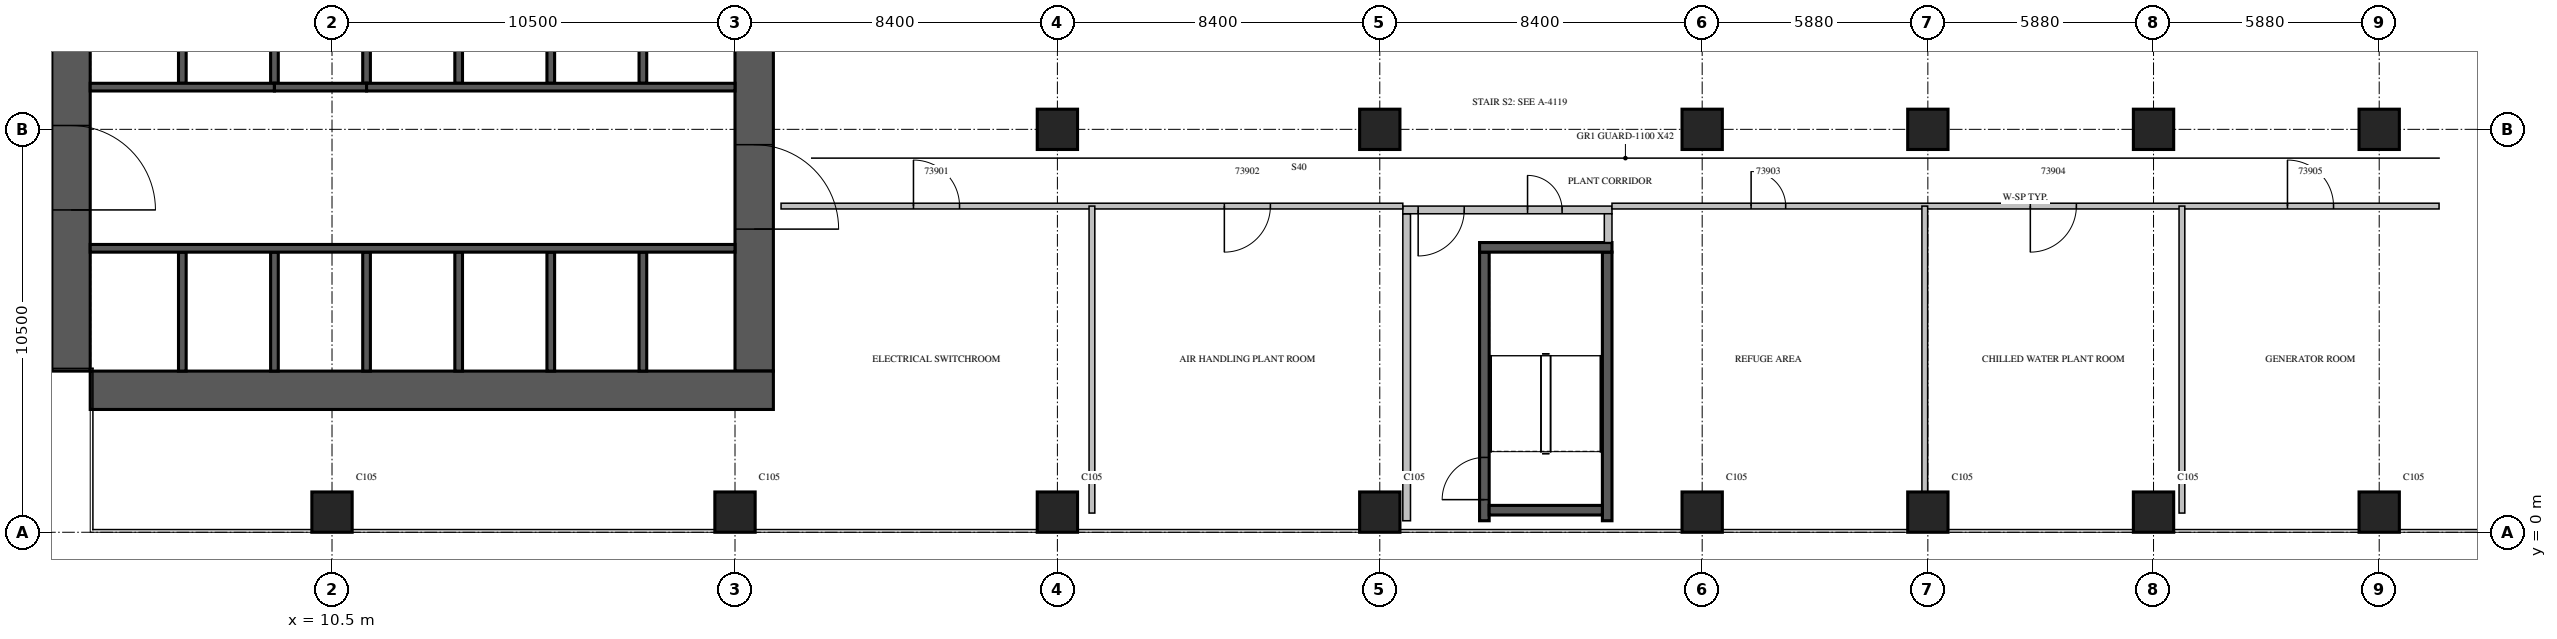
"""IFC4 building model, lengths in metres.
Left out: names, types, materials, properties, quantities, classifications, styles, units other than length and angle.
Written with IfcOpenShell. Run it as: python <this file> out.ifc"""

import sys

from ifc_helpers import new_model, si_unit, direction, frame, frame_2d, origin, origin_2d, place, context, subcontext, project, spatial, rectangle, extrude, source, transform, mapped, element, fill, save


model = new_model("IFC4")
c1 = context("Model", 3, precision=1e-05, world=origin(), true_north=direction((0.0, 1.0)))
c2 = subcontext(c1, "Body", "Model", "MODEL_VIEW")
j1 = project(units=[si_unit("LENGTHUNIT", "METRE"), si_unit("PLANEANGLEUNIT", "RADIAN")], contexts=[c1])
p1 = place(None, origin())
s1 = spatial("IfcSite", under=j1, at=p1, CompositionType="ELEMENT")
p2 = place(p1, origin())
s2 = spatial("IfcBuilding", under=s1, at=p2, CompositionType="ELEMENT")
p3 = place(p2, frame((0.0, 0.0, 162.3)))
s3 = spatial("IfcBuildingStorey", under=s2, at=p3, CompositionType="ELEMENT", Elevation=162.3)
p4 = place(p3, frame((10.5, 0.525, 0.0), z_axis=(0.0, 0.0, 1.0), x_axis=(1.0, 0.0, 0.0)))
e1 = element("IfcColumn", 1, at=p4, inside=s3, PredefinedType="COLUMN", context=c2, shape_type="SweptSolid", body=[
    extrude(rectangle(XDim=1.05, YDim=1.05, at=origin_2d()), origin(), (0.0, 0.0, 1.0), 8.0),
])
m1 = source(origin(), c2, "Body", "SweptSolid", [
    extrude(rectangle(XDim=1.05, YDim=1.05, at=origin_2d()), origin(), (0.0, 0.0, 1.0), 8.0),
])
for number, where, z_axis, x_axis in (
    (2, (21.0, 0.525, 0.0), (0.0, 0.0, 1.0), (1.0, 0.0, 0.0)),
    (3, (29.4, 0.525, 0.0), (0.0, 0.0, 1.0), (1.0, 0.0, 0.0)),
    (4, (37.8, 0.525, 0.0), (0.0, 0.0, 1.0), (1.0, 0.0, 0.0)),
    (5, (46.2, 0.525, 0.0), (0.0, 0.0, 1.0), (1.0, 0.0, 0.0)),
    (6, (52.08, 0.525, 0.0), (0.0, 0.0, 1.0), (1.0, 0.0, 0.0)),
    (7, (57.96, 0.525, 0.0), (0.0, 0.0, 1.0), (1.0, 0.0, 0.0)),
    (8, (63.84, 0.525, 0.0), (0.0, 0.0, 1.0), (1.0, 0.0, 0.0)),
    (9, (29.4, 10.5, 0.0), (0.0, 0.0, 1.0), (1.0, 0.0, 0.0)),
    (10, (37.8, 10.5, 0.0), (0.0, 0.0, 1.0), (1.0, 0.0, 0.0)),
    (11, (46.2, 10.5, 0.0), (0.0, 0.0, 1.0), (1.0, 0.0, 0.0)),
    (12, (52.08, 10.5, 0.0), (0.0, 0.0, 1.0), (1.0, 0.0, 0.0)),
    (13, (57.96, 10.5, 0.0), (0.0, 0.0, 1.0), (1.0, 0.0, 0.0)),
    (14, (63.84, 10.5, 0.0), (0.0, 0.0, 1.0), (1.0, 0.0, 0.0)),
):
    element("IfcColumn", number, at=place(p3, frame(where, z_axis=z_axis, x_axis=x_axis)), inside=s3, PredefinedType="COLUMN", context=c2, shape_type="MappedRepresentation", body=[
        mapped(m1, transform((0.0, 0.0, 0.0), scale=1.0)),
    ])
p5 = place(p3, frame((3.7, 4.2, 0.0), z_axis=(0.0, 0.0, 1.0), x_axis=(0.0, 1.0, 0.0)))
e15 = element("IfcWall", 15, at=p5, inside=s3, PredefinedType="SHEAR", context=c2, shape_type="SweptSolid", body=[
    extrude(rectangle(XDim=17.8, YDim=1.0, at=frame_2d((8.9, 0.0))), origin(), (0.0, 0.0, 1.0), 8.0),
])
m2 = source(origin(), c2, "Body", "SweptSolid", [
    extrude(rectangle(XDim=2.2, YDim=2.1, at=frame_2d((1.1, 1.05))), frame((0.0, 0.51, 0.0), z_axis=(0.0, -1.0, 0.0), x_axis=(1.0, 0.0, 0.0)), (0.0, 0.0, 1.0), 1.02),
])
p6 = place(p5, frame((4.2, 0.0, 0.0)))
e16 = element("IfcOpeningElement", 16, at=p6, cuts=e15, PredefinedType="OPENING", context=c2, shape_type="MappedRepresentation", body=[
    mapped(m2, transform((0.0, 0.0, 0.0), scale=1.0)),
])
p7 = place(p3, frame((21.5, 4.2, 0.0), z_axis=(0.0, 0.0, 1.0), x_axis=(0.0, 1.0, 0.0)))
e17 = element("IfcWall", 17, at=p7, inside=s3, PredefinedType="SHEAR", context=c2, shape_type="SweptSolid", body=[
    extrude(rectangle(XDim=16.8, YDim=1.0, at=frame_2d((8.4, 0.0))), origin(), (0.0, 0.0, 1.0), 8.0),
])
p8 = place(p7, frame((3.7, 0.0, 0.0)))
e18 = element("IfcOpeningElement", 18, at=p8, cuts=e17, PredefinedType="OPENING", context=c2, shape_type="MappedRepresentation", body=[
    mapped(m2, transform((0.0, 0.0, 0.0), scale=1.0)),
])
m3 = source(origin(), c2, "Body", "SweptSolid", [
    extrude(rectangle(XDim=1.2, YDim=2.1, at=frame_2d((0.6, 1.05))), frame((0.0, 0.51, 0.0), z_axis=(0.0, -1.0, 0.0), x_axis=(1.0, 0.0, 0.0)), (0.0, 0.0, 1.0), 1.02),
])
p9 = place(p7, frame((14.7, 0.0, 0.0)))
e19 = element("IfcOpeningElement", 19, at=p9, cuts=e17, PredefinedType="OPENING", context=c2, shape_type="MappedRepresentation", body=[
    mapped(m3, transform((0.0, 0.0, 0.0), scale=1.0)),
])
m4 = source(origin(), c2, "Body", "SweptSolid", [
    extrude(rectangle(XDim=17.8, YDim=1.0, at=frame_2d((8.9, 0.0))), origin(), (0.0, 0.0, 1.0), 8.0),
])
p10 = place(p3, frame((4.2, 3.7, 0.0), z_axis=(0.0, 0.0, 1.0), x_axis=(1.0, 0.0, 0.0)))
e20 = element("IfcWall", 20, at=p10, inside=s3, PredefinedType="SHEAR", context=c2, shape_type="MappedRepresentation", body=[
    mapped(m4, transform((0.0, 0.0, 0.0), scale=1.0)),
])
p11 = place(p3, frame((6.6, 4.2, 0.0), z_axis=(0.0, 0.0, 1.0), x_axis=(0.0, 1.0, 0.0)))
e21 = element("IfcWall", 21, at=p11, inside=s3, PredefinedType="SOLIDWALL", context=c2, shape_type="SweptSolid", body=[
    extrude(rectangle(XDim=3.1, YDim=0.2, at=frame_2d((1.55, 0.0))), origin(), (0.0, 0.0, 1.0), 8.0),
])
m5 = source(origin(), c2, "Body", "SweptSolid", [
    extrude(rectangle(XDim=3.1, YDim=0.2, at=frame_2d((1.55, 0.0))), origin(), (0.0, 0.0, 1.0), 8.0),
])
for number, where, z_axis, x_axis in (
    (22, (9.0, 4.2, 0.0), (0.0, 0.0, 1.0), (0.0, 1.0, 0.0)),
    (23, (11.4, 4.2, 0.0), (0.0, 0.0, 1.0), (0.0, 1.0, 0.0)),
    (24, (13.8, 4.2, 0.0), (0.0, 0.0, 1.0), (0.0, 1.0, 0.0)),
    (25, (16.2, 4.2, 0.0), (0.0, 0.0, 1.0), (0.0, 1.0, 0.0)),
    (26, (18.6, 4.2, 0.0), (0.0, 0.0, 1.0), (0.0, 1.0, 0.0)),
):
    element("IfcWall", number, at=place(p3, frame(where, z_axis=z_axis, x_axis=x_axis)), inside=s3, PredefinedType="SOLIDWALL", context=c2, shape_type="MappedRepresentation", body=[
        mapped(m5, transform((0.0, 0.0, 0.0), scale=1.0)),
    ])
p12 = place(p3, frame((6.6, 11.7, 0.0), z_axis=(0.0, 0.0, 1.0), x_axis=(0.0, 1.0, 0.0)))
e27 = element("IfcWall", 27, at=p12, inside=s3, PredefinedType="SOLIDWALL", context=c2, shape_type="SweptSolid", body=[
    extrude(rectangle(XDim=3.0, YDim=0.2, at=frame_2d((1.5, 0.0))), origin(), (0.0, 0.0, 1.0), 8.0),
])
p13 = place(p3, frame((9.0, 11.7, 0.0), z_axis=(0.0, 0.0, 1.0), x_axis=(0.0, 1.0, 0.0)))
e28 = element("IfcWall", 28, at=p13, inside=s3, PredefinedType="SOLIDWALL", context=c2, shape_type="SweptSolid", body=[
    extrude(rectangle(XDim=3.0, YDim=0.2, at=frame_2d((1.5, 0.0))), origin(), (0.0, 0.0, 1.0), 7.6),
])
m6 = source(origin(), c2, "Body", "SweptSolid", [
    extrude(rectangle(XDim=3.0, YDim=0.2, at=frame_2d((1.5, 0.0))), origin(), (0.0, 0.0, 1.0), 7.6),
])
p14 = place(p3, frame((11.4, 11.7, 0.0), z_axis=(0.0, 0.0, 1.0), x_axis=(0.0, 1.0, 0.0)))
e29 = element("IfcWall", 29, at=p14, inside=s3, PredefinedType="SOLIDWALL", context=c2, shape_type="MappedRepresentation", body=[
    mapped(m6, transform((0.0, 0.0, 0.0), scale=1.0)),
])
m7 = source(origin(), c2, "Body", "SweptSolid", [
    extrude(rectangle(XDim=3.0, YDim=0.2, at=frame_2d((1.5, 0.0))), origin(), (0.0, 0.0, 1.0), 8.0),
])
for number, where, z_axis, x_axis in (
    (30, (13.8, 11.7, 0.0), (0.0, 0.0, 1.0), (0.0, 1.0, 0.0)),
    (31, (16.2, 11.7, 0.0), (0.0, 0.0, 1.0), (0.0, 1.0, 0.0)),
    (32, (18.6, 11.7, 0.0), (0.0, 0.0, 1.0), (0.0, 1.0, 0.0)),
):
    element("IfcWall", number, at=place(p3, frame(where, z_axis=z_axis, x_axis=x_axis)), inside=s3, PredefinedType="SOLIDWALL", context=c2, shape_type="MappedRepresentation", body=[
        mapped(m7, transform((0.0, 0.0, 0.0), scale=1.0)),
    ])
p15 = place(p3, frame((4.2, 7.4, 0.0), z_axis=(0.0, 0.0, 1.0), x_axis=(1.0, 0.0, 0.0)))
e33 = element("IfcWall", 33, at=p15, inside=s3, PredefinedType="SOLIDWALL", context=c2, shape_type="SweptSolid", body=[
    extrude(rectangle(XDim=16.8, YDim=0.2, at=frame_2d((8.4, 0.0))), origin(), (0.0, 0.0, 1.0), 8.0),
])
p16 = place(p3, frame((4.2, 11.6, 0.0), z_axis=(0.0, 0.0, 1.0), x_axis=(1.0, 0.0, 0.0)))
e34 = element("IfcWall", 34, at=p16, inside=s3, PredefinedType="SOLIDWALL", context=c2, shape_type="SweptSolid", body=[
    extrude(rectangle(XDim=4.8, YDim=0.2, at=frame_2d((2.4, 0.0))), origin(), (0.0, 0.0, 1.0), 8.0),
])
p17 = place(p3, frame((9.0, 11.6, 0.0), z_axis=(0.0, 0.0, 1.0), x_axis=(1.0, 0.0, 0.0)))
e35 = element("IfcWall", 35, at=p17, inside=s3, PredefinedType="SOLIDWALL", context=c2, shape_type="SweptSolid", body=[
    extrude(rectangle(XDim=2.4, YDim=0.2, at=frame_2d((1.2, 0.0))), origin(), (0.0, 0.0, 1.0), 7.6),
])
p18 = place(p3, frame((11.4, 11.6, 0.0), z_axis=(0.0, 0.0, 1.0), x_axis=(1.0, 0.0, 0.0)))
e36 = element("IfcWall", 36, at=p18, inside=s3, PredefinedType="SOLIDWALL", context=c2, shape_type="SweptSolid", body=[
    extrude(rectangle(XDim=9.6, YDim=0.2, at=frame_2d((4.8, 0.0))), origin(), (0.0, 0.0, 1.0), 8.0),
])
p19 = place(p3, frame((40.525, 0.3, 0.0), z_axis=(0.0, 0.0, 1.0), x_axis=(0.0, 1.0, 0.0)))
e37 = element("IfcWall", 37, at=p19, inside=s3, PredefinedType="SOLIDWALL", context=c2, shape_type="SweptSolid", body=[
    extrude(rectangle(XDim=7.0, YDim=0.25, at=frame_2d((3.5, 0.0))), origin(), (0.0, 0.0, 1.0), 7.6),
])
m8 = source(origin(), c2, "Body", "SweptSolid", [
    extrude(rectangle(XDim=1.1, YDim=2.1, at=frame_2d((0.55, 1.05))), frame((0.0, 0.135, 0.0), z_axis=(0.0, -1.0, 0.0), x_axis=(1.0, 0.0, 0.0)), (0.0, 0.0, 1.0), 0.27),
])
p20 = place(p19, frame((0.55, 0.0, 0.0)))
e38 = element("IfcOpeningElement", 38, at=p20, cuts=e37, PredefinedType="OPENING", context=c2, shape_type="MappedRepresentation", body=[
    mapped(m8, transform((0.0, 0.0, 0.0), scale=1.0)),
])
m9 = source(origin(), c2, "Body", "SweptSolid", [
    extrude(rectangle(XDim=7.0, YDim=0.25, at=frame_2d((3.5, 0.0))), origin(), (0.0, 0.0, 1.0), 7.6),
])
p21 = place(p3, frame((43.725, 0.3, 0.0), z_axis=(0.0, 0.0, 1.0), x_axis=(0.0, 1.0, 0.0)))
e39 = element("IfcWall", 39, at=p21, inside=s3, PredefinedType="SOLIDWALL", context=c2, shape_type="MappedRepresentation", body=[
    mapped(m9, transform((0.0, 0.0, 0.0), scale=1.0)),
])
p22 = place(p3, frame((40.4, 7.425, 0.0), z_axis=(0.0, 0.0, 1.0), x_axis=(1.0, 0.0, 0.0)))
e40 = element("IfcWall", 40, at=p22, inside=s3, PredefinedType="SOLIDWALL", context=c2, shape_type="SweptSolid", body=[
    extrude(rectangle(XDim=3.45, YDim=0.25, at=frame_2d((1.725, 0.0))), origin(), (0.0, 0.0, 1.0), 7.6),
])
p23 = place(p3, frame((40.65, 0.575, 0.0), z_axis=(0.0, 0.0, 1.0), x_axis=(1.0, 0.0, 0.0)))
e41 = element("IfcWall", 41, at=p23, inside=s3, PredefinedType="SOLIDWALL", context=c2, shape_type="SweptSolid", body=[
    extrude(rectangle(XDim=2.95, YDim=0.25, at=frame_2d((1.475, 0.0))), origin(), (0.0, 0.0, 1.0), 7.6),
])
p24 = place(p3, frame((38.5, 0.3, 0.0), z_axis=(0.0, 0.0, 1.0), x_axis=(0.0, 1.0, 0.0)))
e42 = element("IfcWall", 42, at=p24, inside=s3, PredefinedType="PARTITIONING", context=c2, shape_type="SweptSolid", body=[
    extrude(rectangle(XDim=8.0, YDim=0.2, at=frame_2d((4.0, 0.0))), origin(), (0.0, 0.0, 1.0), 7.6),
])
p25 = place(p3, frame((38.4, 8.4, 0.0), z_axis=(0.0, 0.0, 1.0), x_axis=(1.0, 0.0, 0.0)))
e43 = element("IfcWall", 43, at=p25, inside=s3, PredefinedType="PARTITIONING", context=c2, shape_type="SweptSolid", body=[
    extrude(rectangle(XDim=5.45, YDim=0.2, at=frame_2d((2.725, 0.0))), origin(), (0.0, 0.0, 1.0), 7.6),
])
m10 = source(origin(), c2, "Body", "SweptSolid", [
    extrude(rectangle(XDim=1.2, YDim=2.1, at=frame_2d((0.6, 1.05))), frame((0.0, 0.11, 0.0), z_axis=(0.0, -1.0, 0.0), x_axis=(1.0, 0.0, 0.0)), (0.0, 0.0, 1.0), 0.22),
])
p26 = place(p25, frame((0.4, 0.0, 0.0)))
e44 = element("IfcOpeningElement", 44, at=p26, cuts=e43, PredefinedType="OPENING", context=c2, shape_type="MappedRepresentation", body=[
    mapped(m10, transform((0.0, 0.0, 0.0), scale=1.0)),
])
m11 = source(origin(), c2, "Body", "SweptSolid", [
    extrude(rectangle(XDim=0.9, YDim=2.1, at=frame_2d((0.45, 1.05))), frame((0.0, 0.11, 0.0), z_axis=(0.0, -1.0, 0.0), x_axis=(1.0, 0.0, 0.0)), (0.0, 0.0, 1.0), 0.22),
])
p27 = place(p25, frame((3.25, 0.0, 0.0)))
e45 = element("IfcOpeningElement", 45, at=p27, cuts=e43, PredefinedType="OPENING", context=c2, shape_type="MappedRepresentation", body=[
    mapped(m11, transform((0.0, 0.0, 0.0), scale=1.0)),
])
p28 = place(p3, frame((43.75, 7.55, 0.0), z_axis=(0.0, 0.0, 1.0), x_axis=(0.0, 1.0, 0.0)))
e46 = element("IfcWall", 46, at=p28, inside=s3, PredefinedType="PARTITIONING", context=c2, shape_type="SweptSolid", body=[
    extrude(rectangle(XDim=0.75, YDim=0.2, at=frame_2d((0.375, 0.0))), origin(), (0.0, 0.0, 1.0), 7.6),
])
p29 = place(p3, frame((22.2, 8.5, 0.0), z_axis=(0.0, 0.0, 1.0), x_axis=(1.0, 0.0, 0.0)))
e47 = element("IfcWall", 47, at=p29, inside=s3, PredefinedType="PARTITIONING", context=c2, shape_type="SweptSolid", body=[
    extrude(rectangle(XDim=16.2, YDim=0.15, at=frame_2d((8.1, 0.0))), origin(), (0.0, 0.0, 1.0), 7.6),
])
m12 = source(origin(), c2, "Body", "SweptSolid", [
    extrude(rectangle(XDim=1.2, YDim=2.1, at=frame_2d((0.6, 1.05))), frame((0.0, 0.085, 0.0), z_axis=(0.0, -1.0, 0.0), x_axis=(1.0, 0.0, 0.0)), (0.0, 0.0, 1.0), 0.17),
])
p30 = place(p29, frame((3.45, 0.0, 0.0)))
e48 = element("IfcOpeningElement", 48, at=p30, cuts=e47, PredefinedType="OPENING", context=c2, shape_type="MappedRepresentation", body=[
    mapped(m12, transform((0.0, 0.0, 0.0), scale=1.0)),
])
p31 = place(p29, frame((11.55, 0.0, 0.0)))
e49 = element("IfcOpeningElement", 49, at=p31, cuts=e47, PredefinedType="OPENING", context=c2, shape_type="MappedRepresentation", body=[
    mapped(m12, transform((0.0, 0.0, 0.0), scale=1.0)),
])
p32 = place(p3, frame((43.85, 8.5, 0.0), z_axis=(0.0, 0.0, 1.0), x_axis=(1.0, 0.0, 0.0)))
e50 = element("IfcWall", 50, at=p32, inside=s3, PredefinedType="PARTITIONING", context=c2, shape_type="SweptSolid", body=[
    extrude(rectangle(XDim=21.55, YDim=0.15, at=frame_2d((10.775, 0.0))), origin(), (0.0, 0.0, 1.0), 7.6),
])
m13 = source(origin(), c2, "Body", "SweptSolid", [
    extrude(rectangle(XDim=0.9, YDim=2.1, at=frame_2d((0.45, 1.05))), frame((0.0, 0.085, 0.0), z_axis=(0.0, -1.0, 0.0), x_axis=(1.0, 0.0, 0.0)), (0.0, 0.0, 1.0), 0.17),
])
p33 = place(p32, frame((3.625, 0.0, 0.0)))
e51 = element("IfcOpeningElement", 51, at=p33, cuts=e50, PredefinedType="OPENING", context=c2, shape_type="MappedRepresentation", body=[
    mapped(m13, transform((0.0, 0.0, 0.0), scale=1.0)),
])
p34 = place(p32, frame((10.9, 0.0, 0.0)))
e52 = element("IfcOpeningElement", 52, at=p34, cuts=e50, PredefinedType="OPENING", context=c2, shape_type="MappedRepresentation", body=[
    mapped(m12, transform((0.0, 0.0, 0.0), scale=1.0)),
])
p35 = place(p32, frame((17.6, 0.0, 0.0)))
e53 = element("IfcOpeningElement", 53, at=p35, cuts=e50, PredefinedType="OPENING", context=c2, shape_type="MappedRepresentation", body=[
    mapped(m12, transform((0.0, 0.0, 0.0), scale=1.0)),
])
p36 = place(p3, frame((30.3, 0.5, 0.0), z_axis=(0.0, 0.0, 1.0), x_axis=(0.0, 1.0, 0.0)))
e54 = element("IfcWall", 54, at=p36, inside=s3, PredefinedType="PARTITIONING", context=c2, shape_type="SweptSolid", body=[
    extrude(rectangle(XDim=8.0, YDim=0.15, at=frame_2d((4.0, 0.0))), origin(), (0.0, 0.0, 1.0), 7.6),
])
m14 = source(origin(), c2, "Body", "SweptSolid", [
    extrude(rectangle(XDim=8.0, YDim=0.15, at=frame_2d((4.0, 0.0))), origin(), (0.0, 0.0, 1.0), 7.6),
])
for number, where, z_axis, x_axis in (
    (55, (52.0, 0.5, 0.0), (0.0, 0.0, 1.0), (0.0, 1.0, 0.0)),
    (56, (58.7, 0.5, 0.0), (0.0, 0.0, 1.0), (0.0, 1.0, 0.0)),
):
    element("IfcWall", number, at=place(p3, frame(where, z_axis=z_axis, x_axis=x_axis)), inside=s3, PredefinedType="PARTITIONING", context=c2, shape_type="MappedRepresentation", body=[
        mapped(m14, transform((0.0, 0.0, 0.0), scale=1.0)),
    ])
m15 = source(origin(), c2, "Body", "SweptSolid", [
    extrude(rectangle(XDim=1.1, YDim=2.1, at=frame_2d((0.55, 1.05))), frame((0.0, 0.025, 0.0), z_axis=(0.0, -1.0, 0.0), x_axis=(1.0, 0.0, 0.0)), (0.0, 0.0, 1.0), 0.05),
])
p37 = place(p20, origin())
e57 = element("IfcDoor", 57, at=p37, inside=s3, OperationType="SINGLE_SWING_LEFT", PredefinedType="DOOR", context=c2, shape_type="MappedRepresentation", body=[
    mapped(m15, transform((0.0, 0.0, 0.0), scale=1.0)),
])
fill(e38, e57)
m16 = source(origin(), c2, "Body", "SweptSolid", [
    extrude(rectangle(XDim=1.2, YDim=2.1, at=frame_2d((0.6, 1.05))), frame((0.0, 0.025, 0.0), z_axis=(0.0, -1.0, 0.0), x_axis=(1.0, 0.0, 0.0)), (0.0, 0.0, 1.0), 0.05),
])
p38 = place(p26, origin())
e58 = element("IfcDoor", 58, at=p38, inside=s3, OperationType="SINGLE_SWING_RIGHT", PredefinedType="DOOR", context=c2, shape_type="MappedRepresentation", body=[
    mapped(m16, transform((0.0, 0.0, 0.0), scale=1.0)),
])
fill(e44, e58)
m17 = source(origin(), c2, "Body", "SweptSolid", [
    extrude(rectangle(XDim=0.9, YDim=2.1, at=frame_2d((0.45, 1.05))), frame((0.0, 0.025, 0.0), z_axis=(0.0, -1.0, 0.0), x_axis=(1.0, 0.0, 0.0)), (0.0, 0.0, 1.0), 0.05),
])
p39 = place(p27, origin())
e59 = element("IfcDoor", 59, at=p39, inside=s3, OperationType="SINGLE_SWING_LEFT", PredefinedType="DOOR", context=c2, shape_type="MappedRepresentation", body=[
    mapped(m17, transform((0.0, 0.0, 0.0), scale=1.0)),
])
fill(e45, e59)
m18 = source(origin(), c2, "Body", "SweptSolid", [
    extrude(rectangle(XDim=2.2, YDim=2.1, at=frame_2d((1.1, 1.05))), frame((0.0, 0.025, 0.0), z_axis=(0.0, -1.0, 0.0), x_axis=(1.0, 0.0, 0.0)), (0.0, 0.0, 1.0), 0.05),
])
p40 = place(p8, origin())
e60 = element("IfcDoor", 60, at=p40, inside=s3, OperationType="DOUBLE_DOOR_SINGLE_SWING", PredefinedType="DOOR", context=c2, shape_type="MappedRepresentation", body=[
    mapped(m18, transform((0.0, 0.0, 0.0), scale=1.0)),
])
fill(e18, e60)
p41 = place(p6, origin())
e61 = element("IfcDoor", 61, at=p41, inside=s3, OperationType="DOUBLE_DOOR_SINGLE_SWING", PredefinedType="DOOR", context=c2, shape_type="MappedRepresentation", body=[
    mapped(m18, transform((0.0, 0.0, 0.0), scale=1.0)),
])
fill(e16, e61)
p42 = place(p30, origin())
e62 = element("IfcDoor", 62, at=p42, inside=s3, OperationType="SINGLE_SWING_LEFT", PredefinedType="DOOR", context=c2, shape_type="MappedRepresentation", body=[
    mapped(m16, transform((0.0, 0.0, 0.0), scale=1.0)),
])
fill(e48, e62)
p43 = place(p31, origin())
e63 = element("IfcDoor", 63, at=p43, inside=s3, OperationType="SINGLE_SWING_RIGHT", PredefinedType="DOOR", context=c2, shape_type="MappedRepresentation", body=[
    mapped(m16, transform((0.0, 0.0, 0.0), scale=1.0)),
])
fill(e49, e63)
p44 = place(p33, origin())
e64 = element("IfcDoor", 64, at=p44, inside=s3, OperationType="SINGLE_SWING_LEFT", PredefinedType="DOOR", context=c2, shape_type="MappedRepresentation", body=[
    mapped(m17, transform((0.0, 0.0, 0.0), scale=1.0)),
])
fill(e51, e64)
p45 = place(p34, origin())
e65 = element("IfcDoor", 65, at=p45, inside=s3, OperationType="SINGLE_SWING_RIGHT", PredefinedType="DOOR", context=c2, shape_type="MappedRepresentation", body=[
    mapped(m16, transform((0.0, 0.0, 0.0), scale=1.0)),
])
fill(e52, e65)
p46 = place(p35, origin())
e66 = element("IfcDoor", 66, at=p46, inside=s3, OperationType="SINGLE_SWING_LEFT", PredefinedType="DOOR", context=c2, shape_type="MappedRepresentation", body=[
    mapped(m16, transform((0.0, 0.0, 0.0), scale=1.0)),
])
fill(e53, e66)
save(model, sys.argv[1])
